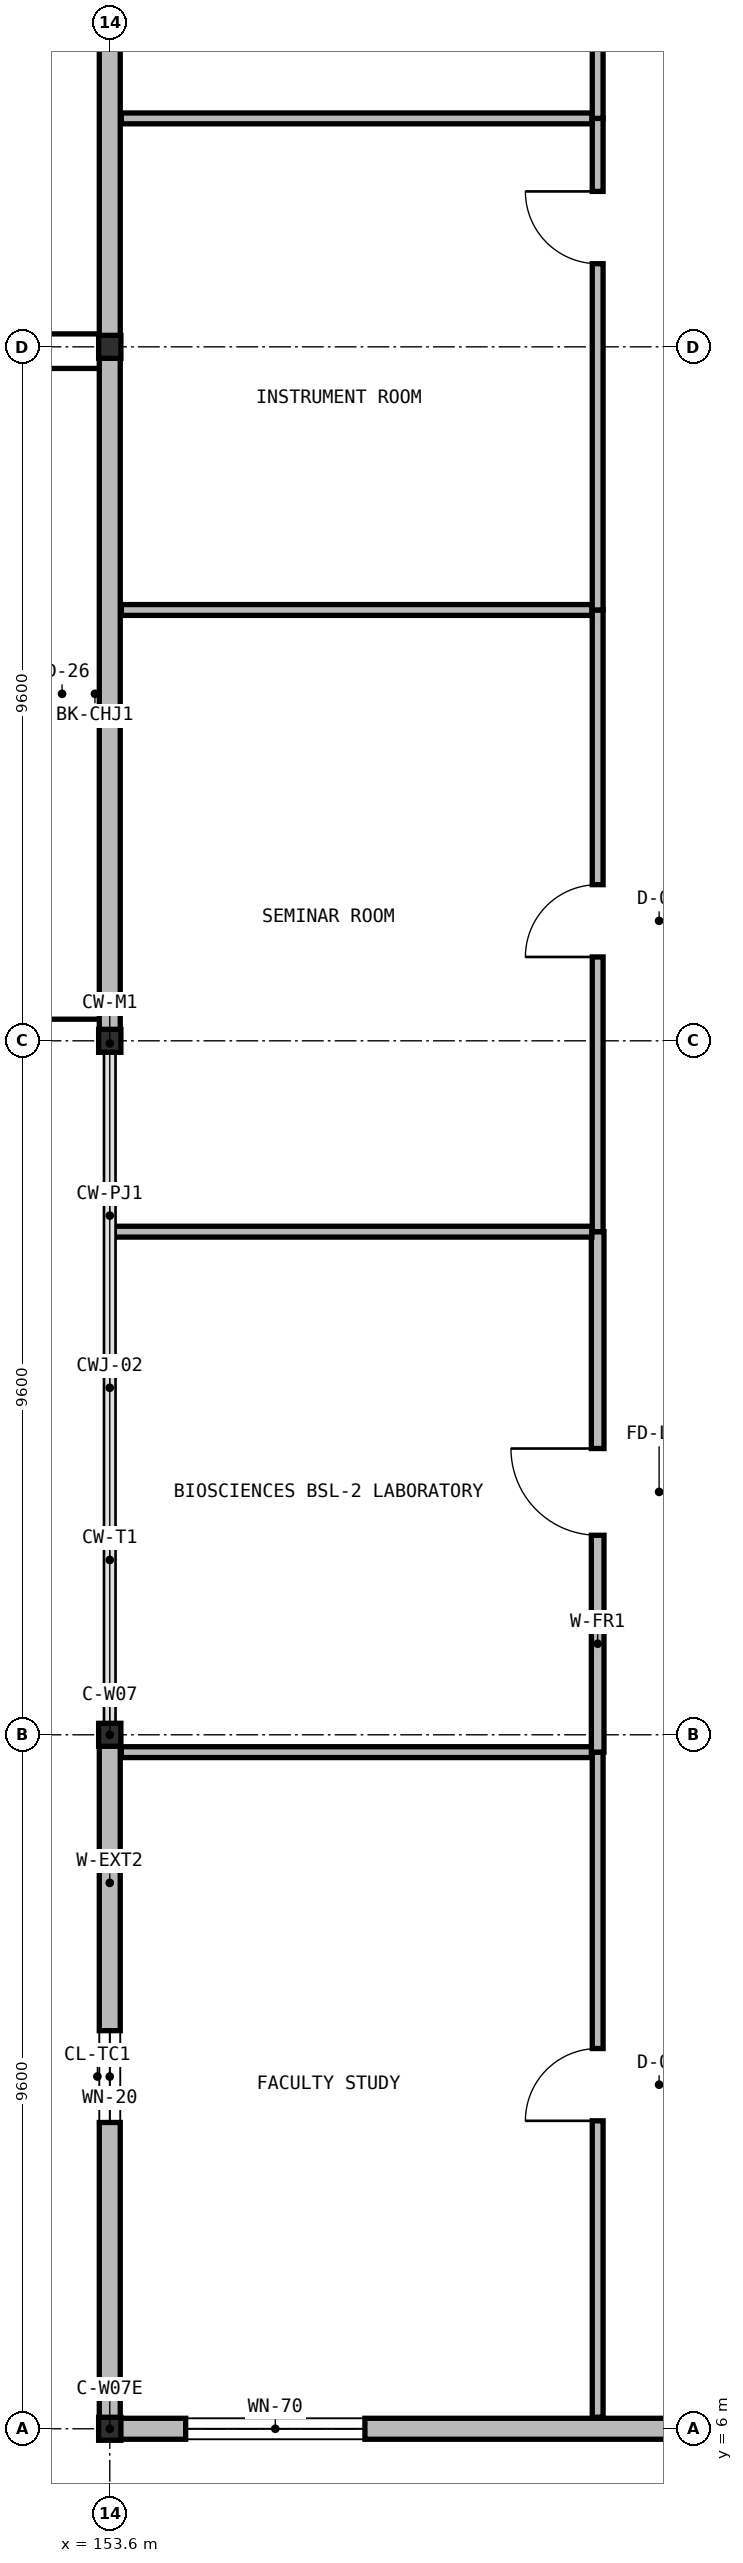
"""IFC4 building model, lengths in metres.
Left out: names, types, materials, properties, quantities, classifications, styles, units other than length and angle.
Written with IfcOpenShell. Run it as: python <this file> out.ifc"""

import sys

from ifc_helpers import new_model, si_unit, direction, frame, frame_2d, origin, origin_2d, place, context, subcontext, project, spatial, rectangle, i_section, extrude, element, fill, save


model = new_model("IFC4")
c1 = context("Model", 3, precision=1e-05, world=origin(), true_north=direction((0.0, 1.0)))
c2 = subcontext(c1, "Body", "Model", "MODEL_VIEW")
j1 = project(units=[si_unit("LENGTHUNIT", "METRE"), si_unit("PLANEANGLEUNIT", "RADIAN")], contexts=[c1])
p1 = place(None, origin())
s1 = spatial("IfcSite", under=j1, at=p1, CompositionType="ELEMENT")
p2 = place(p1, origin())
s2 = spatial("IfcBuilding", under=s1, at=p2, CompositionType="ELEMENT")
p3 = place(p2, frame((0.0, 0.0, 37.1)))
s3 = spatial("IfcBuildingStorey", under=s2, at=p3, CompositionType="ELEMENT", Elevation=37.1)
for number, where, z_axis, x_axis in (
    (1, (153.6, 6.0, 0.0), (0.0, 0.0, 1.0), (1.0, 0.0, 0.0)),
    (2, (153.6, 15.6, 0.0), (0.0, 0.0, 1.0), (1.0, 0.0, 0.0)),
    (3, (153.6, 25.2, 0.0), (0.0, 0.0, 1.0), (1.0, 0.0, 0.0)),
    (4, (153.6, 34.8, 0.0), (0.0, 0.0, 1.0), (1.0, 0.0, 0.0)),
):
    element("IfcColumn", number, at=place(p3, frame(where, z_axis=z_axis, x_axis=x_axis)), inside=s3, PredefinedType="COLUMN", context=c2, shape_type="SweptSolid", body=[
        extrude(i_section(OverallWidth=0.308, OverallDepth=0.318, WebThickness=0.013, FlangeThickness=0.021, at=origin_2d()), origin(), (0.0, 0.0, 1.0), 4.55),
    ])
p4 = place(p3, frame((153.6, 6.149, 0.0), z_axis=(0.0, 0.0, 1.0), x_axis=(0.0, 1.0, 0.0)))
e5 = element("IfcWall", 5, at=p4, inside=s3, PredefinedType="SOLIDWALL", context=c2, shape_type="SweptSolid", body=[
    extrude(rectangle(XDim=9.447, YDim=0.29, at=frame_2d((4.724, 0.0))), origin(), (0.0, 0.0, 1.0), 3.908),
])
p5 = place(p4, frame((4.088, 0.0, 0.95)))
e6 = element("IfcOpeningElement", 6, at=p5, cuts=e5, PredefinedType="OPENING", context=c2, shape_type="SweptSolid", body=[
    extrude(rectangle(XDim=1.27, YDim=1.8, at=frame_2d((0.635, 0.9))), frame((0.0, 0.155, 0.0), z_axis=(0.0, -1.0, 0.0), x_axis=(1.0, 0.0, 0.0)), (0.0, 0.0, 1.0), 0.31),
])
p6 = place(p3, frame((153.6, 25.204, 0.0), z_axis=(0.0, 0.0, 1.0), x_axis=(0.0, 1.0, 0.0)))
e7 = element("IfcWall", 7, at=p6, inside=s3, PredefinedType="SOLIDWALL", context=c2, shape_type="SweptSolid", body=[
    extrude(rectangle(XDim=9.592, YDim=0.29, at=frame_2d((4.796, 0.0))), origin(), (0.0, 0.0, 1.0), 3.908),
])
p7 = place(p3, frame((153.6, 34.804, 0.0), z_axis=(0.0, 0.0, 1.0), x_axis=(0.0, 1.0, 0.0)))
e8 = element("IfcWall", 8, at=p7, inside=s3, PredefinedType="SOLIDWALL", context=c2, shape_type="SweptSolid", body=[
    extrude(rectangle(XDim=9.592, YDim=0.29, at=frame_2d((4.796, 0.0))), origin(), (0.0, 0.0, 1.0), 3.908),
])
p8 = place(p3, frame((163.196, 6.0, 0.0), z_axis=(0.0, 0.0, 1.0), x_axis=(-1.0, 0.0, 0.0)))
e9 = element("IfcWall", 9, at=p8, inside=s3, PredefinedType="SOLIDWALL", context=c2, shape_type="SweptSolid", body=[
    extrude(rectangle(XDim=9.741, YDim=0.29, at=frame_2d((4.871, 0.0))), origin(), (0.0, 0.0, 1.0), 3.899),
])
p9 = place(p8, frame((6.066, 0.0, 0.95)))
e10 = element("IfcOpeningElement", 10, at=p9, cuts=e9, PredefinedType="OPENING", context=c2, shape_type="SweptSolid", body=[
    extrude(rectangle(XDim=2.48, YDim=1.56, at=frame_2d((1.24, 0.78))), frame((0.0, 0.155, 0.0), z_axis=(0.0, -1.0, 0.0), x_axis=(1.0, 0.0, 0.0)), (0.0, 0.0, 1.0), 0.31),
])
p10 = place(p3, frame((160.35, 6.16, 0.0), z_axis=(0.0, 0.0, 1.0), x_axis=(0.0, 1.0, 0.0)))
e11 = element("IfcWall", 11, at=p10, inside=s3, PredefinedType="PARTITIONING", context=c2, shape_type="SweptSolid", body=[
    extrude(rectangle(XDim=9.2, YDim=0.15, at=frame_2d((4.6, 0.0))), origin(), (0.0, 0.0, 1.0), 4.3),
])
p11 = place(p10, frame((4.1, 0.0, 0.0)))
e12 = element("IfcOpeningElement", 12, at=p11, cuts=e11, PredefinedType="OPENING", context=c2, shape_type="SweptSolid", body=[
    extrude(rectangle(XDim=1.0, YDim=2.2, at=frame_2d((0.5, 1.1))), frame((0.0, 0.085, 0.0), z_axis=(0.0, -1.0, 0.0), x_axis=(1.0, 0.0, 0.0)), (0.0, 0.0, 1.0), 0.17),
])
p12 = place(p3, frame((153.76, 15.36, 0.0), z_axis=(0.0, 0.0, 1.0), x_axis=(1.0, 0.0, 0.0)))
e13 = element("IfcWall", 13, at=p12, inside=s3, PredefinedType="PARTITIONING", context=c2, shape_type="SweptSolid", body=[
    extrude(rectangle(XDim=6.51, YDim=0.15, at=frame_2d((3.255, 0.0))), origin(), (0.0, 0.0, 1.0), 4.3),
])
p13 = place(p3, frame((160.35, 15.36, 0.0), z_axis=(0.0, 0.0, 1.0), x_axis=(0.0, 1.0, 0.0)))
e14 = element("IfcWall", 14, at=p13, inside=s3, PredefinedType="PARTITIONING", context=c2, shape_type="SweptSolid", body=[
    extrude(rectangle(XDim=7.2, YDim=0.175, at=frame_2d((3.6, 0.0))), origin(), (0.0, 0.0, 1.0), 4.3),
])
p14 = place(p13, frame((3.0, 0.0, 0.0)))
e15 = element("IfcOpeningElement", 15, at=p14, cuts=e14, PredefinedType="OPENING", context=c2, shape_type="SweptSolid", body=[
    extrude(rectangle(XDim=1.2, YDim=2.2, at=frame_2d((0.6, 1.1))), frame((0.0, 0.097, 0.0), z_axis=(0.0, -1.0, 0.0), x_axis=(1.0, 0.0, 0.0)), (0.0, 0.0, 1.0), 0.195),
])
p15 = place(p3, frame((153.66, 22.56, 0.0), z_axis=(0.0, 0.0, 1.0), x_axis=(1.0, 0.0, 0.0)))
e16 = element("IfcWall", 16, at=p15, inside=s3, PredefinedType="PARTITIONING", context=c2, shape_type="SweptSolid", body=[
    extrude(rectangle(XDim=6.61, YDim=0.15, at=frame_2d((3.305, 0.0))), origin(), (0.0, 0.0, 1.0), 4.3),
])
p16 = place(p3, frame((160.35, 22.56, 0.0), z_axis=(0.0, 0.0, 1.0), x_axis=(0.0, 1.0, 0.0)))
e17 = element("IfcWall", 17, at=p16, inside=s3, PredefinedType="PARTITIONING", context=c2, shape_type="SweptSolid", body=[
    extrude(rectangle(XDim=8.6, YDim=0.15, at=frame_2d((4.3, 0.0))), origin(), (0.0, 0.0, 1.0), 4.3),
])
p17 = place(p16, frame((3.8, 0.0, 0.0)))
e18 = element("IfcOpeningElement", 18, at=p17, cuts=e17, PredefinedType="OPENING", context=c2, shape_type="SweptSolid", body=[
    extrude(rectangle(XDim=1.0, YDim=2.2, at=frame_2d((0.5, 1.1))), frame((0.0, 0.085, 0.0), z_axis=(0.0, -1.0, 0.0), x_axis=(1.0, 0.0, 0.0)), (0.0, 0.0, 1.0), 0.17),
])
p18 = place(p3, frame((153.76, 31.16, 0.0), z_axis=(0.0, 0.0, 1.0), x_axis=(1.0, 0.0, 0.0)))
e19 = element("IfcWall", 19, at=p18, inside=s3, PredefinedType="PARTITIONING", context=c2, shape_type="SweptSolid", body=[
    extrude(rectangle(XDim=6.51, YDim=0.15, at=frame_2d((3.255, 0.0))), origin(), (0.0, 0.0, 1.0), 4.3),
])
p19 = place(p3, frame((160.35, 31.16, 0.0), z_axis=(0.0, 0.0, 1.0), x_axis=(0.0, 1.0, 0.0)))
e20 = element("IfcWall", 20, at=p19, inside=s3, PredefinedType="PARTITIONING", context=c2, shape_type="SweptSolid", body=[
    extrude(rectangle(XDim=6.8, YDim=0.15, at=frame_2d((3.4, 0.0))), origin(), (0.0, 0.0, 1.0), 4.3),
])
p20 = place(p19, frame((4.79, 0.0, 0.0)))
e21 = element("IfcOpeningElement", 21, at=p20, cuts=e20, PredefinedType="OPENING", context=c2, shape_type="SweptSolid", body=[
    extrude(rectangle(XDim=1.0, YDim=2.2, at=frame_2d((0.5, 1.1))), frame((0.0, 0.085, 0.0), z_axis=(0.0, -1.0, 0.0), x_axis=(1.0, 0.0, 0.0)), (0.0, 0.0, 1.0), 0.17),
])
p21 = place(p3, frame((153.76, 37.96, 0.0), z_axis=(0.0, 0.0, 1.0), x_axis=(1.0, 0.0, 0.0)))
e22 = element("IfcWall", 22, at=p21, inside=s3, PredefinedType="PARTITIONING", context=c2, shape_type="SweptSolid", body=[
    extrude(rectangle(XDim=6.51, YDim=0.15, at=frame_2d((3.255, 0.0))), origin(), (0.0, 0.0, 1.0), 4.3),
])
p22 = place(p3, frame((160.35, 37.96, 0.0), z_axis=(0.0, 0.0, 1.0), x_axis=(0.0, 1.0, 0.0)))
e23 = element("IfcWall", 23, at=p22, inside=s3, PredefinedType="PARTITIONING", context=c2, shape_type="SweptSolid", body=[
    extrude(rectangle(XDim=9.2, YDim=0.15, at=frame_2d((4.6, 0.0))), origin(), (0.0, 0.0, 1.0), 4.3),
])
p23 = place(p22, frame((4.1, 0.0, 0.0)))
e24 = element("IfcOpeningElement", 24, at=p23, cuts=e23, PredefinedType="OPENING", context=c2, shape_type="SweptSolid", body=[
    extrude(rectangle(XDim=1.0, YDim=2.2, at=frame_2d((0.5, 1.1))), frame((0.0, 0.085, 0.0), z_axis=(0.0, -1.0, 0.0), x_axis=(1.0, 0.0, 0.0)), (0.0, 0.0, 1.0), 0.17),
])
p24 = place(p5, origin())
e25 = element("IfcWindow", 25, at=p24, inside=s3, PartitioningType="SINGLE_PANEL", PredefinedType="WINDOW", context=c2, shape_type="SweptSolid", body=[
    extrude(rectangle(XDim=1.27, YDim=1.8, at=frame_2d((0.635, 0.9))), frame((0.0, 0.03, 0.0), z_axis=(0.0, -1.0, 0.0), x_axis=(1.0, 0.0, 0.0)), (0.0, 0.0, 1.0), 0.06),
])
fill(e6, e25)
p25 = place(p9, origin())
e26 = element("IfcWindow", 26, at=p25, inside=s3, PartitioningType="SINGLE_PANEL", PredefinedType="WINDOW", context=c2, shape_type="SweptSolid", body=[
    extrude(rectangle(XDim=2.48, YDim=1.56, at=frame_2d((1.24, 0.78))), frame((0.0, 0.03, 0.0), z_axis=(0.0, -1.0, 0.0), x_axis=(1.0, 0.0, 0.0)), (0.0, 0.0, 1.0), 0.06),
])
fill(e10, e26)
p26 = place(p11, origin())
e27 = element("IfcDoor", 27, at=p26, inside=s3, OperationType="SINGLE_SWING_LEFT", PredefinedType="DOOR", context=c2, shape_type="SweptSolid", body=[
    extrude(rectangle(XDim=1.0, YDim=2.2, at=frame_2d((0.5, 1.1))), frame((0.0, 0.025, 0.0), z_axis=(0.0, -1.0, 0.0), x_axis=(1.0, 0.0, 0.0)), (0.0, 0.0, 1.0), 0.05),
])
fill(e12, e27)
p27 = place(p14, origin())
e28 = element("IfcDoor", 28, at=p27, inside=s3, OperationType="SINGLE_SWING_RIGHT", PredefinedType="DOOR", context=c2, shape_type="SweptSolid", body=[
    extrude(rectangle(XDim=1.2, YDim=2.2, at=frame_2d((0.6, 1.1))), frame((0.0, 0.025, 0.0), z_axis=(0.0, -1.0, 0.0), x_axis=(1.0, 0.0, 0.0)), (0.0, 0.0, 1.0), 0.05),
])
fill(e15, e28)
p28 = place(p17, origin())
e29 = element("IfcDoor", 29, at=p28, inside=s3, OperationType="SINGLE_SWING_LEFT", PredefinedType="DOOR", context=c2, shape_type="SweptSolid", body=[
    extrude(rectangle(XDim=1.0, YDim=2.2, at=frame_2d((0.5, 1.1))), frame((0.0, 0.025, 0.0), z_axis=(0.0, -1.0, 0.0), x_axis=(1.0, 0.0, 0.0)), (0.0, 0.0, 1.0), 0.05),
])
fill(e18, e29)
p29 = place(p20, origin())
e30 = element("IfcDoor", 30, at=p29, inside=s3, OperationType="SINGLE_SWING_RIGHT", PredefinedType="DOOR", context=c2, shape_type="SweptSolid", body=[
    extrude(rectangle(XDim=1.0, YDim=2.2, at=frame_2d((0.5, 1.1))), frame((0.0, 0.025, 0.0), z_axis=(0.0, -1.0, 0.0), x_axis=(1.0, 0.0, 0.0)), (0.0, 0.0, 1.0), 0.05),
])
fill(e21, e30)
save(model, sys.argv[1])
